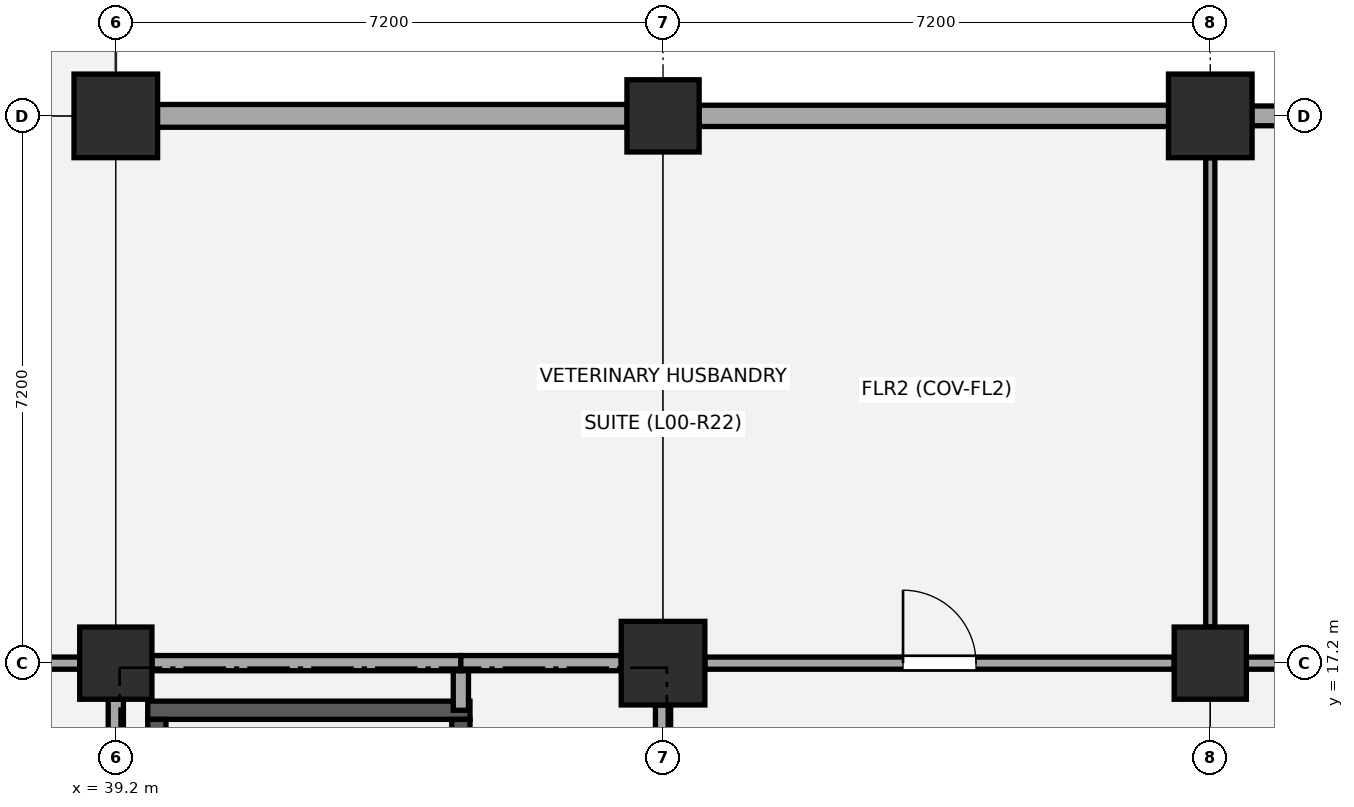
"""IFC4 building model, lengths in metres.
Left out: names, types, materials, properties, quantities, classifications, styles, units other than length and angle.
Written with IfcOpenShell. Run it as: python <this file> out.ifc"""

import sys

from ifc_helpers import new_model, si_unit, direction, frame, frame_2d, origin, origin_2d, place, context, subcontext, project, spatial, rectangle, extrude, element, fill, save


model = new_model("IFC4")
c1 = context("Model", 3, precision=1e-05, world=origin(), true_north=direction((0.0, 1.0)))
c2 = subcontext(c1, "Body", "Model", "MODEL_VIEW")
j1 = project(units=[si_unit("LENGTHUNIT", "METRE"), si_unit("PLANEANGLEUNIT", "RADIAN")], contexts=[c1])
p1 = place(None, origin())
s1 = spatial("IfcSite", under=j1, at=p1, CompositionType="ELEMENT")
p2 = place(p1, origin())
s2 = spatial("IfcBuilding", under=s1, at=p2, CompositionType="ELEMENT")
p3 = place(p2, origin())
s3 = spatial("IfcBuildingStorey", under=s2, at=p3, CompositionType="ELEMENT", Elevation=0.0)
p4 = place(p3, frame((39.2, 17.2, -0.35), z_axis=(0.0, 0.0, 1.0), x_axis=(1.0, 0.0, 0.0)))
e1 = element("IfcColumn", 1, at=p4, inside=s3, PredefinedType="COLUMN", context=c2, shape_type="SweptSolid", body=[
    extrude(rectangle(XDim=0.95, YDim=0.95, at=origin_2d()), origin(), (0.0, 0.0, 1.0), 5.03),
])
for number, where, z_axis, x_axis in (
    (2, (39.2, 24.4, -0.35), (0.0, 0.0, 1.0), (1.0, 0.0, 0.0)),
    (3, (46.4, 17.2, -0.35), (0.0, 0.0, 1.0), (1.0, 0.0, 0.0)),
):
    element("IfcColumn", number, at=place(p3, frame(where, z_axis=z_axis, x_axis=x_axis)), inside=s3, PredefinedType="COLUMN", context=c2, shape_type="SweptSolid", body=[
        extrude(rectangle(XDim=1.1, YDim=1.1, at=origin_2d()), origin(), (0.0, 0.0, 1.0), 5.03),
    ])
for number, where, z_axis, x_axis in (
    (4, (46.4, 24.4, -0.35), (0.0, 0.0, 1.0), (1.0, 0.0, 0.0)),
    (5, (53.6, 17.2, -0.35), (0.0, 0.0, 1.0), (1.0, 0.0, 0.0)),
):
    element("IfcColumn", number, at=place(p3, frame(where, z_axis=z_axis, x_axis=x_axis)), inside=s3, PredefinedType="COLUMN", context=c2, shape_type="SweptSolid", body=[
        extrude(rectangle(XDim=0.95, YDim=0.95, at=origin_2d()), origin(), (0.0, 0.0, 1.0), 5.03),
    ])
p5 = place(p3, frame((53.6, 24.4, -0.35), z_axis=(0.0, 0.0, 1.0), x_axis=(1.0, 0.0, 0.0)))
e6 = element("IfcColumn", 6, at=p5, inside=s3, PredefinedType="COLUMN", context=c2, shape_type="SweptSolid", body=[
    extrude(rectangle(XDim=1.1, YDim=1.1, at=origin_2d()), origin(), (0.0, 0.0, 1.0), 5.03),
])
p6 = place(p3, frame((39.745, 24.4, 0.0), z_axis=(0.0, 0.0, 1.0), x_axis=(1.0, 0.0, 0.0)))
e7 = element("IfcWall", 7, at=p6, inside=s3, PredefinedType="STANDARD", context=c2, shape_type="SweptSolid", body=[
    extrude(rectangle(XDim=6.185, YDim=0.3, at=frame_2d((3.092, 0.0))), origin(), (0.0, 0.0, 1.0), 2.47),
])
p7 = place(p3, frame((46.87, 24.4, 0.0), z_axis=(0.0, 0.0, 1.0), x_axis=(1.0, 0.0, 0.0)))
e8 = element("IfcWall", 8, at=p7, inside=s3, PredefinedType="STANDARD", context=c2, shape_type="SweptSolid", body=[
    extrude(rectangle(XDim=6.185, YDim=0.28, at=frame_2d((3.092, 0.0))), origin(), (0.0, 0.0, 1.0), 2.37),
])
p8 = place(p3, frame((54.145, 24.4, 0.0), z_axis=(0.0, 0.0, 1.0), x_axis=(1.0, 0.0, 0.0)))
e9 = element("IfcWall", 9, at=p8, inside=s3, PredefinedType="STANDARD", context=c2, shape_type="SweptSolid", body=[
    extrude(rectangle(XDim=6.185, YDim=0.26, at=frame_2d((3.093, 0.0))), origin(), (0.0, 0.0, 1.0), 2.47),
])
p9 = place(p3, frame((39.62, 16.58, 0.0), z_axis=(0.0, 0.0, 1.0), x_axis=(1.0, 0.0, 0.0)))
e10 = element("IfcWall", 10, at=p9, inside=s3, PredefinedType="SHEAR", context=c2, shape_type="SweptSolid", body=[
    extrude(rectangle(XDim=4.24, YDim=0.24, at=frame_2d((2.12, 0.0))), origin(), (0.0, 0.0, 1.0), 3.48),
])
p10 = place(p3, frame((39.74, 10.74, 0.0), z_axis=(0.0, 0.0, 1.0), x_axis=(0.0, 1.0, 0.0)))
e11 = element("IfcWall", 11, at=p10, inside=s3, PredefinedType="SHEAR", context=c2, shape_type="SweptSolid", body=[
    extrude(rectangle(XDim=5.72, YDim=0.24, at=frame_2d((2.86, 0.0))), origin(), (0.0, 0.0, 1.0), 3.48),
])
p11 = place(p3, frame((43.74, 10.74, 0.0), z_axis=(0.0, 0.0, 1.0), x_axis=(0.0, 1.0, 0.0)))
e12 = element("IfcWall", 12, at=p11, inside=s3, PredefinedType="SHEAR", context=c2, shape_type="SweptSolid", body=[
    extrude(rectangle(XDim=5.72, YDim=0.24, at=frame_2d((2.86, 0.0))), origin(), (0.0, 0.0, 1.0), 3.48),
])
p12 = place(p11, frame((0.22, 0.0, 0.0)))
e13 = element("IfcOpeningElement", 13, at=p12, cuts=e12, PredefinedType="OPENING", context=c2, shape_type="SweptSolid", body=[
    extrude(rectangle(XDim=1.12, YDim=2.15, at=frame_2d((0.56, 1.075))), frame((0.0, 0.13, 0.0), z_axis=(0.0, -1.0, 0.0), x_axis=(1.0, 0.0, 0.0)), (0.0, 0.0, 1.0), 0.26),
])
p13 = place(p3, frame((43.74, 16.58, 0.0), z_axis=(0.0, 0.0, 1.0), x_axis=(0.0, 1.0, 0.0)))
e14 = element("IfcWall", 14, at=p13, inside=s3, PredefinedType="PARTITIONING", context=c2, shape_type="SweptSolid", body=[
    extrude(rectangle(XDim=0.62, YDim=0.2, at=frame_2d((0.31, 0.0))), origin(), (0.0, 0.0, 1.0), 2.47),
])
p14 = place(p3, frame((39.2, 10.55, 0.0), z_axis=(0.0, 0.0, 1.0), x_axis=(0.0, 1.0, 0.0)))
e15 = element("IfcWall", 15, at=p14, inside=s3, PredefinedType="PARTITIONING", context=c2, shape_type="SweptSolid", body=[
    extrude(rectangle(XDim=6.175, YDim=0.2, at=frame_2d((3.087, 0.0))), origin(), (0.0, 0.0, 1.0), 2.47),
])
p15 = place(p3, frame((46.4, 10.475, 0.0), z_axis=(0.0, 0.0, 1.0), x_axis=(0.0, 1.0, 0.0)))
e16 = element("IfcWall", 16, at=p15, inside=s3, PredefinedType="PARTITIONING", context=c2, shape_type="SweptSolid", body=[
    extrude(rectangle(XDim=6.175, YDim=0.2, at=frame_2d((3.087, 0.0))), origin(), (0.0, 0.0, 1.0), 2.47),
])
p16 = place(p3, frame((39.675, 17.2, 0.0), z_axis=(0.0, 0.0, 1.0), x_axis=(1.0, 0.0, 0.0)))
e17 = element("IfcWall", 17, at=p16, inside=s3, PredefinedType="PARTITIONING", context=c2, shape_type="SweptSolid", body=[
    extrude(rectangle(XDim=4.065, YDim=0.2, at=frame_2d((2.032, 0.0))), origin(), (0.0, 0.0, 1.0), 2.47),
])
p17 = place(p3, frame((43.74, 17.2, 0.0), z_axis=(0.0, 0.0, 1.0), x_axis=(1.0, 0.0, 0.0)))
e18 = element("IfcWall", 18, at=p17, inside=s3, PredefinedType="PARTITIONING", context=c2, shape_type="SweptSolid", body=[
    extrude(rectangle(XDim=2.11, YDim=0.2, at=frame_2d((1.055, 0.0))), origin(), (0.0, 0.0, 1.0), 2.47),
])
p18 = place(p3, frame((32.35, 17.2, 0.0), z_axis=(0.0, 0.0, 1.0), x_axis=(1.0, 0.0, 0.0)))
e19 = element("IfcWall", 19, at=p18, inside=s3, PredefinedType="PARTITIONING", context=c2, shape_type="SweptSolid", body=[
    extrude(rectangle(XDim=6.375, YDim=0.16, at=frame_2d((3.188, 0.0))), origin(), (0.0, 0.0, 1.0), 3.52),
])
p19 = place(p3, frame((46.95, 17.2, 0.0), z_axis=(0.0, 0.0, 1.0), x_axis=(1.0, 0.0, 0.0)))
e20 = element("IfcWall", 20, at=p19, inside=s3, PredefinedType="PARTITIONING", context=c2, shape_type="SweptSolid", body=[
    extrude(rectangle(XDim=6.175, YDim=0.16, at=frame_2d((3.087, 0.0))), origin(), (0.0, 0.0, 1.0), 2.37),
])
p20 = place(p19, frame((2.607, 0.0, 0.0)))
e21 = element("IfcOpeningElement", 21, at=p20, cuts=e20, PredefinedType="OPENING", context=c2, shape_type="SweptSolid", body=[
    extrude(rectangle(XDim=0.96, YDim=2.1, at=frame_2d((0.48, 1.05))), frame((0.0, 0.09, 0.0), z_axis=(0.0, -1.0, 0.0), x_axis=(1.0, 0.0, 0.0)), (0.0, 0.0, 1.0), 0.18),
])
p21 = place(p3, frame((53.6, 17.675, 0.0), z_axis=(0.0, 0.0, 1.0), x_axis=(0.0, 1.0, 0.0)))
e22 = element("IfcWall", 22, at=p21, inside=s3, PredefinedType="PARTITIONING", context=c2, shape_type="SweptSolid", body=[
    extrude(rectangle(XDim=6.175, YDim=0.12, at=frame_2d((3.087, 0.0))), origin(), (0.0, 0.0, 1.0), 2.47),
])
p22 = place(p3, frame((54.075, 17.2, 0.0), z_axis=(0.0, 0.0, 1.0), x_axis=(1.0, 0.0, 0.0)))
e23 = element("IfcWall", 23, at=p22, inside=s3, PredefinedType="PARTITIONING", context=c2, shape_type="SweptSolid", body=[
    extrude(rectangle(XDim=6.175, YDim=0.16, at=frame_2d((3.087, 0.0))), origin(), (0.0, 0.0, 1.0), 2.47),
])
p23 = place(p20, origin())
e24 = element("IfcDoor", 24, at=p23, inside=s3, OperationType="SINGLE_SWING_LEFT", PredefinedType="DOOR", context=c2, shape_type="SweptSolid", body=[
    extrude(rectangle(XDim=0.96, YDim=2.1, at=frame_2d((0.48, 1.05))), frame((0.0, 0.025, 0.0), z_axis=(0.0, -1.0, 0.0), x_axis=(1.0, 0.0, 0.0)), (0.0, 0.0, 1.0), 0.05),
])
fill(e21, e24)
save(model, sys.argv[1])
